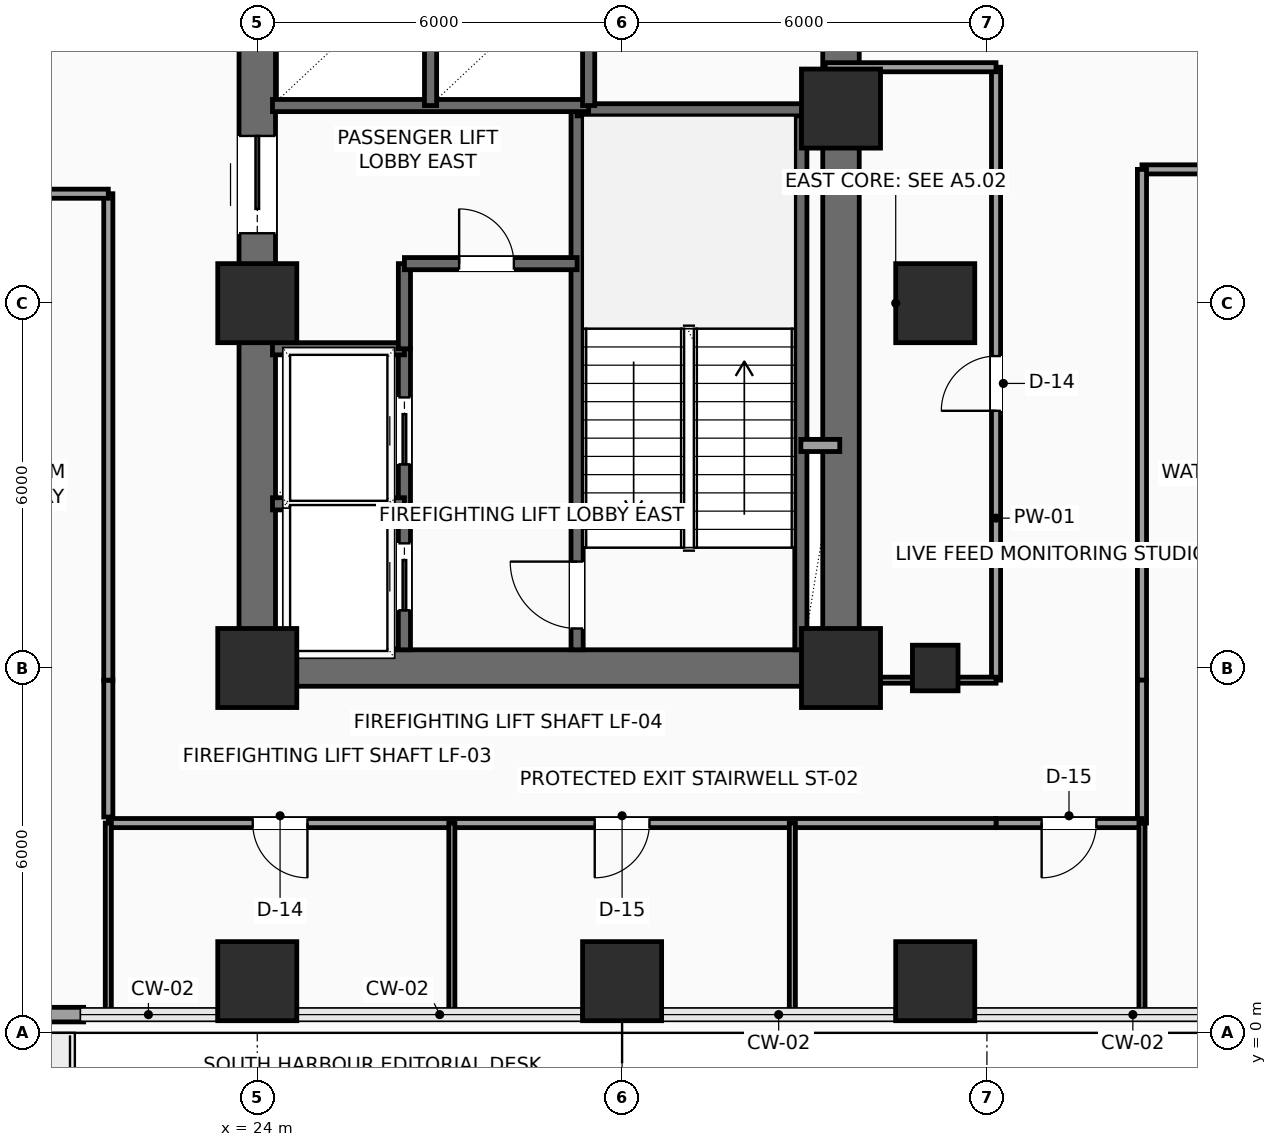
"""IFC4 building model, lengths in metres.
Left out: names, types, materials, properties, quantities, classifications, styles, units other than length and angle.
Written with IfcOpenShell. Run it as: python <this file> out.ifc"""

import sys

from ifc_helpers import new_model, si_unit, direction, frame, frame_2d, origin, origin_2d, place, context, subcontext, project, spatial, rectangle, hollow_rectangle, extrude, element, fill, save


model = new_model("IFC4")
c1 = context("Model", 3, precision=1e-05, world=origin(), true_north=direction((0.0, 1.0)))
c2 = subcontext(c1, "Body", "Model", "MODEL_VIEW")
j1 = project(units=[si_unit("LENGTHUNIT", "METRE"), si_unit("PLANEANGLEUNIT", "RADIAN")], contexts=[c1])
p1 = place(None, origin())
s1 = spatial("IfcSite", under=j1, at=p1, CompositionType="ELEMENT")
p2 = place(p1, origin())
s2 = spatial("IfcBuilding", under=s1, at=p2, CompositionType="ELEMENT")
p3 = place(p2, frame((0.0, 0.0, 32.4)))
s3 = spatial("IfcBuildingStorey", under=s2, at=p3, CompositionType="ELEMENT", Elevation=32.4)
for number, where, z_axis, x_axis in (
    (1, (24.0, 6.0, 0.0), (0.0, 0.0, 1.0), (1.0, 0.0, 0.0)),
    (2, (24.0, 12.0, 0.0), (0.0, 0.0, 1.0), (1.0, 0.0, 0.0)),
    (3, (33.6, 6.0, 0.0), (0.0, 0.0, 1.0), (1.0, 0.0, 0.0)),
    (4, (33.6, 15.2, 0.0), (0.0, 0.0, 1.0), (1.0, 0.0, 0.0)),
    (5, (24.0, 0.85, 0.0), (0.0, 0.0, 1.0), (1.0, 0.0, 0.0)),
    (6, (30.0, 0.85, 0.0), (0.0, 0.0, 1.0), (1.0, 0.0, 0.0)),
    (7, (35.15, 0.85, 0.0), (0.0, 0.0, 1.0), (1.0, 0.0, 0.0)),
):
    element("IfcColumn", number, at=place(p3, frame(where, z_axis=z_axis, x_axis=x_axis)), inside=s3, PredefinedType="COLUMN", context=c2, shape_type="SweptSolid", body=[
        extrude(rectangle(XDim=1.3, YDim=1.3, at=origin_2d()), origin(), (0.0, 0.0, 1.0), 3.9),
    ])
p4 = place(p3, frame((35.15, 6.0, 0.0), z_axis=(0.0, 0.0, 1.0), x_axis=(1.0, 0.0, 0.0)))
e8 = element("IfcColumn", 8, at=p4, inside=s3, PredefinedType="COLUMN", context=c2, shape_type="SweptSolid", body=[
    extrude(hollow_rectangle(XDim=0.75, YDim=0.75, WallThickness=0.035, InnerFilletRadius=0.035, OuterFilletRadius=0.05, at=origin_2d()), origin(), (0.0, 0.0, 1.0), 3.9),
])
p5 = place(p3, frame((35.15, 12.0, 0.0), z_axis=(0.0, 0.0, 1.0), x_axis=(1.0, 0.0, 0.0)))
e9 = element("IfcColumn", 9, at=p5, inside=s3, PredefinedType="COLUMN", context=c2, shape_type="SweptSolid", body=[
    extrude(rectangle(XDim=1.3, YDim=1.3, at=origin_2d()), origin(), (0.0, 0.0, 1.0), 3.9),
])
p6 = place(p3, frame((21.145, 0.3, 0.0), z_axis=(0.0, 0.0, 1.0), x_axis=(-1.0, 0.0, 0.0)))
e10 = element("IfcWall", 10, at=p6, inside=s3, PredefinedType="SOLIDWALL", context=c2, shape_type="SweptSolid", body=[
    extrude(rectangle(XDim=9.29, YDim=0.24, at=frame_2d((4.645, 0.0))), origin(), (0.0, 0.0, 1.0), 3.65),
])
p7 = place(p6, frame((3.945, 0.0, 0.0)))
e11 = element("IfcOpeningElement", 11, at=p7, cuts=e10, PredefinedType="OPENING", context=c2, shape_type="SweptSolid", body=[
    extrude(rectangle(XDim=1.05, YDim=2.2, at=frame_2d((0.525, 1.1))), frame((0.0, 0.13, 0.0), z_axis=(0.0, -1.0, 0.0), x_axis=(1.0, 0.0, 0.0)), (0.0, 0.0, 1.0), 0.26),
])
p8 = place(p3, frame((24.0, 6.0, 0.0), z_axis=(0.0, 0.0, 1.0), x_axis=(1.0, 0.0, 0.0)))
e12 = element("IfcWall", 12, at=p8, inside=s3, PredefinedType="SHEAR", context=c2, shape_type="SweptSolid", body=[
    extrude(rectangle(XDim=9.6, YDim=0.6, at=frame_2d((4.8, 0.0))), origin(), (0.0, 0.0, 1.0), 3.65),
])
p9 = place(p3, frame((24.0, 6.0, 0.0), z_axis=(0.0, 0.0, 1.0), x_axis=(0.0, 1.0, 0.0)))
e13 = element("IfcWall", 13, at=p9, inside=s3, PredefinedType="SHEAR", context=c2, shape_type="SweptSolid", body=[
    extrude(rectangle(XDim=12.0, YDim=0.6, at=frame_2d((6.0, 0.0))), origin(), (0.0, 0.0, 1.0), 3.65),
])
p10 = place(p9, frame((7.15, 0.0, 0.0)))
e14 = element("IfcOpeningElement", 14, at=p10, cuts=e13, PredefinedType="OPENING", context=c2, shape_type="SweptSolid", body=[
    extrude(rectangle(XDim=1.6, YDim=2.3, at=frame_2d((0.8, 1.15))), frame((0.0, 0.31, 0.0), z_axis=(0.0, -1.0, 0.0), x_axis=(1.0, 0.0, 0.0)), (0.0, 0.0, 1.0), 0.62),
])
p11 = place(p3, frame((33.6, 6.0, 0.0), z_axis=(0.0, 0.0, 1.0), x_axis=(0.0, 1.0, 0.0)))
e15 = element("IfcWall", 15, at=p11, inside=s3, PredefinedType="SHEAR", context=c2, shape_type="SweptSolid", body=[
    extrude(rectangle(XDim=12.0, YDim=0.6, at=frame_2d((6.0, 0.0))), origin(), (0.0, 0.0, 1.0), 3.65),
])
p12 = place(p11, frame((10.2, 0.0, 0.0)))
e16 = element("IfcOpeningElement", 16, at=p12, cuts=e15, PredefinedType="OPENING", context=c2, shape_type="SweptSolid", body=[
    extrude(rectangle(XDim=0.9, YDim=2.15, at=frame_2d((0.45, 1.075))), frame((0.0, 0.31, 0.0), z_axis=(0.0, -1.0, 0.0), x_axis=(1.0, 0.0, 0.0)), (0.0, 0.0, 1.0), 0.62),
])
p13 = place(p3, frame((29.26, 6.3, 0.0), z_axis=(0.0, 0.0, 1.0), x_axis=(0.0, 1.0, 0.0)))
e17 = element("IfcWall", 17, at=p13, inside=s3, PredefinedType="SHEAR", context=c2, shape_type="SweptSolid", body=[
    extrude(rectangle(XDim=8.88, YDim=0.2, at=frame_2d((4.44, 0.0))), origin(), (0.0, 0.0, 1.0), 3.65),
])
p14 = place(p13, frame((0.35, 0.0, 0.0)))
e18 = element("IfcOpeningElement", 18, at=p14, cuts=e17, PredefinedType="OPENING", context=c2, shape_type="SweptSolid", body=[
    extrude(rectangle(XDim=1.1, YDim=2.2, at=frame_2d((0.55, 1.1))), frame((0.0, 0.11, 0.0), z_axis=(0.0, -1.0, 0.0), x_axis=(1.0, 0.0, 0.0)), (0.0, 0.0, 1.0), 0.22),
])
p15 = place(p3, frame((32.94, 6.3, 0.0), z_axis=(0.0, 0.0, 1.0), x_axis=(0.0, 1.0, 0.0)))
e19 = element("IfcWall", 19, at=p15, inside=s3, PredefinedType="SHEAR", context=c2, shape_type="SweptSolid", body=[
    extrude(rectangle(XDim=8.88, YDim=0.2, at=frame_2d((4.44, 0.0))), origin(), (0.0, 0.0, 1.0), 3.65),
])
p16 = place(p3, frame((29.26, 15.18, 0.0), z_axis=(0.0, 0.0, 1.0), x_axis=(1.0, 0.0, 0.0)))
e20 = element("IfcWall", 20, at=p16, inside=s3, PredefinedType="SHEAR", context=c2, shape_type="SweptSolid", body=[
    extrude(rectangle(XDim=4.04, YDim=0.2, at=frame_2d((2.02, 0.0))), origin(), (0.0, 0.0, 1.0), 3.65),
])
p17 = place(p3, frame((26.42, 6.3, 0.0), z_axis=(0.0, 0.0, 1.0), x_axis=(0.0, 1.0, 0.0)))
e21 = element("IfcWall", 21, at=p17, inside=s3, PredefinedType="SHEAR", context=c2, shape_type="SweptSolid", body=[
    extrude(rectangle(XDim=4.95, YDim=0.2, at=frame_2d((2.475, 0.0))), origin(), (0.0, 0.0, 1.0), 3.65),
])
p18 = place(p17, frame((0.65, 0.0, 0.0)))
e22 = element("IfcOpeningElement", 22, at=p18, cuts=e21, PredefinedType="OPENING", context=c2, shape_type="SweptSolid", body=[
    extrude(rectangle(XDim=1.1, YDim=2.2, at=frame_2d((0.55, 1.1))), frame((0.0, 0.11, 0.0), z_axis=(0.0, -1.0, 0.0), x_axis=(1.0, 0.0, 0.0)), (0.0, 0.0, 1.0), 0.22),
])
p19 = place(p17, frame((3.05, 0.0, 0.0)))
e23 = element("IfcOpeningElement", 23, at=p19, cuts=e21, PredefinedType="OPENING", context=c2, shape_type="SweptSolid", body=[
    extrude(rectangle(XDim=1.1, YDim=2.2, at=frame_2d((0.55, 1.1))), frame((0.0, 0.11, 0.0), z_axis=(0.0, -1.0, 0.0), x_axis=(1.0, 0.0, 0.0)), (0.0, 0.0, 1.0), 0.22),
])
for number, where, z_axis, x_axis in (
    (24, (24.25, 8.7, 0.0), (0.0, 0.0, 1.0), (1.0, 0.0, 0.0)),
    (25, (24.25, 11.25, 0.0), (0.0, 0.0, 1.0), (1.0, 0.0, 0.0)),
):
    element("IfcWall", number, at=place(p3, frame(where, z_axis=z_axis, x_axis=x_axis)), inside=s3, PredefinedType="SHEAR", context=c2, shape_type="SweptSolid", body=[
        extrude(rectangle(XDim=2.17, YDim=0.2, at=frame_2d((1.085, 0.0))), origin(), (0.0, 0.0, 1.0), 3.65),
    ])
p20 = place(p3, frame((26.42, 11.25, 0.0), z_axis=(0.0, 0.0, 1.0), x_axis=(0.0, 1.0, 0.0)))
e26 = element("IfcWall", 26, at=p20, inside=s3, PredefinedType="SHEAR", context=c2, shape_type="SweptSolid", body=[
    extrude(rectangle(XDim=1.4, YDim=0.2, at=frame_2d((0.7, 0.0))), origin(), (0.0, 0.0, 1.0), 3.65),
])
p21 = place(p3, frame((26.42, 12.65, 0.0), z_axis=(0.0, 0.0, 1.0), x_axis=(1.0, 0.0, 0.0)))
e27 = element("IfcWall", 27, at=p21, inside=s3, PredefinedType="SHEAR", context=c2, shape_type="SweptSolid", body=[
    extrude(rectangle(XDim=2.84, YDim=0.2, at=frame_2d((1.42, 0.0))), origin(), (0.0, 0.0, 1.0), 3.65),
])
p22 = place(p21, frame((0.9, 0.0, 0.0)))
e28 = element("IfcOpeningElement", 28, at=p22, cuts=e27, PredefinedType="OPENING", context=c2, shape_type="SweptSolid", body=[
    extrude(rectangle(XDim=0.9, YDim=2.15, at=frame_2d((0.45, 1.075))), frame((0.0, 0.11, 0.0), z_axis=(0.0, -1.0, 0.0), x_axis=(1.0, 0.0, 0.0)), (0.0, 0.0, 1.0), 0.22),
])
p23 = place(p3, frame((32.94, 9.66, 0.0), z_axis=(0.0, 0.0, 1.0), x_axis=(1.0, 0.0, 0.0)))
e29 = element("IfcWall", 29, at=p23, inside=s3, PredefinedType="SOLIDWALL", context=c2, shape_type="SweptSolid", body=[
    extrude(rectangle(XDim=0.64, YDim=0.2, at=frame_2d((0.32, 0.0))), origin(), (0.0, 0.0, 1.0), 3.65),
])
p24 = place(p3, frame((24.25, 15.25, 0.0), z_axis=(0.0, 0.0, 1.0), x_axis=(1.0, 0.0, 0.0)))
e30 = element("IfcWall", 30, at=p24, inside=s3, PredefinedType="SHEAR", context=c2, shape_type="SweptSolid", body=[
    extrude(rectangle(XDim=5.2, YDim=0.2, at=frame_2d((2.6, 0.0))), origin(), (0.0, 0.0, 1.0), 3.65),
])
p25 = place(p3, frame((26.85, 15.25, 0.0), z_axis=(0.0, 0.0, 1.0), x_axis=(0.0, 1.0, 0.0)))
e31 = element("IfcWall", 31, at=p25, inside=s3, PredefinedType="SHEAR", context=c2, shape_type="SweptSolid", body=[
    extrude(rectangle(XDim=2.4, YDim=0.2, at=frame_2d((1.2, 0.0))), origin(), (0.0, 0.0, 1.0), 3.65),
])
p26 = place(p3, frame((29.45, 15.25, 0.0), z_axis=(0.0, 0.0, 1.0), x_axis=(0.0, 1.0, 0.0)))
e32 = element("IfcWall", 32, at=p26, inside=s3, PredefinedType="SHEAR", context=c2, shape_type="SweptSolid", body=[
    extrude(rectangle(XDim=2.45, YDim=0.2, at=frame_2d((1.225, 0.0))), origin(), (0.0, 0.0, 1.0), 3.65),
])
p27 = place(p3, frame((36.15, 5.8, 0.0), z_axis=(0.0, 0.0, 1.0), x_axis=(0.0, 1.0, 0.0)))
e33 = element("IfcWall", 33, at=p27, inside=s3, PredefinedType="PARTITIONING", context=c2, shape_type="SweptSolid", body=[
    extrude(rectangle(XDim=10.08, YDim=0.15, at=frame_2d((5.04, 0.0))), origin(), (0.0, 0.0, 1.0), 3.65),
])
p28 = place(p27, frame((4.43, 0.0, 0.0)))
e34 = element("IfcOpeningElement", 34, at=p28, cuts=e33, PredefinedType="OPENING", context=c2, shape_type="SweptSolid", body=[
    extrude(rectangle(XDim=0.9, YDim=2.1, at=frame_2d((0.45, 1.05))), frame((0.0, 0.085, 0.0), z_axis=(0.0, -1.0, 0.0), x_axis=(1.0, 0.0, 0.0)), (0.0, 0.0, 1.0), 0.17),
])
p29 = place(p3, frame((36.15, 15.88, 0.0), z_axis=(0.0, 0.0, 1.0), x_axis=(-1.0, 0.0, 0.0)))
e35 = element("IfcWall", 35, at=p29, inside=s3, PredefinedType="PARTITIONING", context=c2, shape_type="SweptSolid", body=[
    extrude(rectangle(XDim=2.81, YDim=0.15, at=frame_2d((1.405, 0.0))), origin(), (0.0, 0.0, 1.0), 3.65),
])
p30 = place(p3, frame((50.9, 14.2, 0.0), z_axis=(0.0, 0.0, 1.0), x_axis=(-1.0, 0.0, 0.0)))
e36 = element("IfcWall", 36, at=p30, inside=s3, PredefinedType="PARTITIONING", context=c2, shape_type="SweptSolid", body=[
    extrude(rectangle(XDim=12.35, YDim=0.15, at=frame_2d((6.175, 0.0))), origin(), (0.0, 0.0, 1.0), 3.65),
])
p31 = place(p30, frame((9.175, 0.0, 0.0)))
e37 = element("IfcOpeningElement", 37, at=p31, cuts=e36, PredefinedType="OPENING", context=c2, shape_type="SweptSolid", body=[
    extrude(rectangle(XDim=0.9, YDim=2.1, at=frame_2d((0.45, 1.05))), frame((0.0, 0.085, 0.0), z_axis=(0.0, -1.0, 0.0), x_axis=(1.0, 0.0, 0.0)), (0.0, 0.0, 1.0), 0.17),
])
p32 = place(p30, frame((3.0, 0.0, 0.0)))
e38 = element("IfcOpeningElement", 38, at=p32, cuts=e36, PredefinedType="OPENING", context=c2, shape_type="SweptSolid", body=[
    extrude(rectangle(XDim=0.9, YDim=2.1, at=frame_2d((0.45, 1.05))), frame((0.0, 0.085, 0.0), z_axis=(0.0, -1.0, 0.0), x_axis=(1.0, 0.0, 0.0)), (0.0, 0.0, 1.0), 0.17),
])
p33 = place(p3, frame((38.55, 14.2, 0.0), z_axis=(0.0, 0.0, 1.0), x_axis=(0.0, -1.0, 0.0)))
e39 = element("IfcWall", 39, at=p33, inside=s3, PredefinedType="PARTITIONING", context=c2, shape_type="SweptSolid", body=[
    extrude(rectangle(XDim=8.4, YDim=0.15, at=frame_2d((4.2, 0.0))), origin(), (0.0, 0.0, 1.0), 3.65),
])
p34 = place(p3, frame((38.55, 5.8, 0.0), z_axis=(0.0, 0.0, 1.0), x_axis=(0.0, -1.0, 0.0)))
e40 = element("IfcWall", 40, at=p34, inside=s3, PredefinedType="PARTITIONING", context=c2, shape_type="SweptSolid", body=[
    extrude(rectangle(XDim=2.35, YDim=0.15, at=frame_2d((1.175, 0.0))), origin(), (0.0, 0.0, 1.0), 3.65),
])
p35 = place(p3, frame((38.55, 3.45, 0.0), z_axis=(0.0, 0.0, 1.0), x_axis=(-1.0, 0.0, 0.0)))
e41 = element("IfcWall", 41, at=p35, inside=s3, PredefinedType="PARTITIONING", context=c2, shape_type="SweptSolid", body=[
    extrude(rectangle(XDim=2.4, YDim=0.15, at=frame_2d((1.2, 0.0))), origin(), (0.0, 0.0, 1.0), 3.142),
])
p36 = place(p35, frame((0.75, 0.0, 0.0)))
e42 = element("IfcOpeningElement", 42, at=p36, cuts=e41, PredefinedType="OPENING", context=c2, shape_type="SweptSolid", body=[
    extrude(rectangle(XDim=0.9, YDim=2.1, at=frame_2d((0.45, 1.05))), frame((0.0, 0.085, 0.0), z_axis=(0.0, -1.0, 0.0), x_axis=(1.0, 0.0, 0.0)), (0.0, 0.0, 1.0), 0.17),
])
p37 = place(p3, frame((36.15, 3.45, 0.0), z_axis=(0.0, 0.0, 1.0), x_axis=(-1.0, 0.0, 0.0)))
e43 = element("IfcWall", 43, at=p37, inside=s3, PredefinedType="PARTITIONING", context=c2, shape_type="SweptSolid", body=[
    extrude(rectangle(XDim=14.6, YDim=0.15, at=frame_2d((7.3, 0.0))), origin(), (0.0, 0.0, 1.0), 3.142),
])
p38 = place(p37, frame((11.325, 0.0, 0.0)))
e44 = element("IfcOpeningElement", 44, at=p38, cuts=e43, PredefinedType="OPENING", context=c2, shape_type="SweptSolid", body=[
    extrude(rectangle(XDim=0.9, YDim=2.1, at=frame_2d((0.45, 1.05))), frame((0.0, 0.085, 0.0), z_axis=(0.0, -1.0, 0.0), x_axis=(1.0, 0.0, 0.0)), (0.0, 0.0, 1.0), 0.17),
])
p39 = place(p37, frame((5.7, 0.0, 0.0)))
e45 = element("IfcOpeningElement", 45, at=p39, cuts=e43, PredefinedType="OPENING", context=c2, shape_type="SweptSolid", body=[
    extrude(rectangle(XDim=0.9, YDim=2.1, at=frame_2d((0.45, 1.05))), frame((0.0, 0.085, 0.0), z_axis=(0.0, -1.0, 0.0), x_axis=(1.0, 0.0, 0.0)), (0.0, 0.0, 1.0), 0.17),
])
p40 = place(p3, frame((21.55, 3.55, 0.0), z_axis=(0.0, 0.0, 1.0), x_axis=(0.0, 1.0, 0.0)))
e46 = element("IfcWall", 46, at=p40, inside=s3, PredefinedType="PARTITIONING", context=c2, shape_type="SweptSolid", body=[
    extrude(rectangle(XDim=2.25, YDim=0.15, at=frame_2d((1.125, 0.0))), origin(), (0.0, 0.0, 1.0), 3.65),
])
p41 = place(p3, frame((21.55, 5.8, 0.0), z_axis=(0.0, 0.0, 1.0), x_axis=(0.0, 1.0, 0.0)))
e47 = element("IfcWall", 47, at=p41, inside=s3, PredefinedType="PARTITIONING", context=c2, shape_type="SweptSolid", body=[
    extrude(rectangle(XDim=8.0, YDim=0.15, at=frame_2d((4.0, 0.0))), origin(), (0.0, 0.0, 1.0), 3.65),
])
p42 = place(p3, frame((21.55, 13.8, 0.0), z_axis=(0.0, 0.0, 1.0), x_axis=(-1.0, 0.0, 0.0)))
e48 = element("IfcWall", 48, at=p42, inside=s3, PredefinedType="PARTITIONING", context=c2, shape_type="SweptSolid", body=[
    extrude(rectangle(XDim=8.95, YDim=0.15, at=frame_2d((4.475, 0.0))), origin(), (0.0, 0.0, 1.0), 3.65),
])
p43 = place(p42, frame((5.4, 0.0, 0.0)))
e49 = element("IfcOpeningElement", 49, at=p43, cuts=e48, PredefinedType="OPENING", context=c2, shape_type="SweptSolid", body=[
    extrude(rectangle(XDim=0.9, YDim=2.1, at=frame_2d((0.45, 1.05))), frame((0.0, 0.085, 0.0), z_axis=(0.0, -1.0, 0.0), x_axis=(1.0, 0.0, 0.0)), (0.0, 0.0, 1.0), 0.17),
])
p44 = place(p42, frame((1.225, 0.0, 0.0)))
e50 = element("IfcOpeningElement", 50, at=p44, cuts=e48, PredefinedType="OPENING", context=c2, shape_type="SweptSolid", body=[
    extrude(rectangle(XDim=0.9, YDim=2.1, at=frame_2d((0.45, 1.05))), frame((0.0, 0.085, 0.0), z_axis=(0.0, -1.0, 0.0), x_axis=(1.0, 0.0, 0.0)), (0.0, 0.0, 1.0), 0.17),
])
for number, where, z_axis, x_axis in (
    (51, (21.55, 0.3, 0.0), (0.0, 0.0, 1.0), (0.0, 1.0, 0.0)),
    (52, (27.2, 0.3, 0.0), (0.0, 0.0, 1.0), (0.0, 1.0, 0.0)),
    (53, (32.8, 0.3, 0.0), (0.0, 0.0, 1.0), (0.0, 1.0, 0.0)),
    (54, (38.55, 0.3, 0.0), (0.0, 0.0, 1.0), (0.0, 1.0, 0.0)),
):
    element("IfcWall", number, at=place(p3, frame(where, z_axis=z_axis, x_axis=x_axis)), inside=s3, PredefinedType="PARTITIONING", context=c2, shape_type="SweptSolid", body=[
        extrude(rectangle(XDim=3.15, YDim=0.1, at=frame_2d((1.575, 0.0))), origin(), (0.0, 0.0, 1.0), 3.65),
    ])
p45 = place(p3, frame((33.65, 5.8, 0.0), z_axis=(0.0, 0.0, 1.0), x_axis=(1.0, 0.0, 0.0)))
e55 = element("IfcWall", 55, at=p45, inside=s3, PredefinedType="PARTITIONING", context=c2, shape_type="SweptSolid", body=[
    extrude(rectangle(XDim=2.5, YDim=0.1, at=frame_2d((1.25, 0.0))), origin(), (0.0, 0.0, 1.0), 2.992),
])
p46 = place(p10, origin())
e56 = element("IfcDoor", 56, at=p46, inside=s3, OperationType="DOUBLE_DOOR_SLIDING", PredefinedType="DOOR", context=c2, shape_type="SweptSolid", body=[
    extrude(rectangle(XDim=1.6, YDim=2.3, at=frame_2d((0.8, 1.15))), frame((0.0, 0.025, 0.0), z_axis=(0.0, -1.0, 0.0), x_axis=(1.0, 0.0, 0.0)), (0.0, 0.0, 1.0), 0.05),
])
fill(e14, e56)
p47 = place(p14, origin())
e57 = element("IfcDoor", 57, at=p47, inside=s3, OperationType="SINGLE_SWING_RIGHT", PredefinedType="DOOR", context=c2, shape_type="SweptSolid", body=[
    extrude(rectangle(XDim=1.1, YDim=2.2, at=frame_2d((0.55, 1.1))), frame((0.0, 0.025, 0.0), z_axis=(0.0, -1.0, 0.0), x_axis=(1.0, 0.0, 0.0)), (0.0, 0.0, 1.0), 0.05),
])
fill(e18, e57)
p48 = place(p18, origin())
e58 = element("IfcDoor", 58, at=p48, inside=s3, OperationType="SLIDING_TO_LEFT", PredefinedType="DOOR", context=c2, shape_type="SweptSolid", body=[
    extrude(rectangle(XDim=1.1, YDim=2.2, at=frame_2d((0.55, 1.1))), frame((0.0, 0.025, 0.0), z_axis=(0.0, -1.0, 0.0), x_axis=(1.0, 0.0, 0.0)), (0.0, 0.0, 1.0), 0.05),
])
fill(e22, e58)
p49 = place(p19, origin())
e59 = element("IfcDoor", 59, at=p49, inside=s3, OperationType="SLIDING_TO_LEFT", PredefinedType="DOOR", context=c2, shape_type="SweptSolid", body=[
    extrude(rectangle(XDim=1.1, YDim=2.2, at=frame_2d((0.55, 1.1))), frame((0.0, 0.025, 0.0), z_axis=(0.0, -1.0, 0.0), x_axis=(1.0, 0.0, 0.0)), (0.0, 0.0, 1.0), 0.05),
])
fill(e23, e59)
p50 = place(p22, origin())
e60 = element("IfcDoor", 60, at=p50, inside=s3, OperationType="SINGLE_SWING_LEFT", PredefinedType="DOOR", context=c2, shape_type="SweptSolid", body=[
    extrude(rectangle(XDim=0.9, YDim=2.15, at=frame_2d((0.45, 1.075))), frame((0.0, 0.025, 0.0), z_axis=(0.0, -1.0, 0.0), x_axis=(1.0, 0.0, 0.0)), (0.0, 0.0, 1.0), 0.05),
])
fill(e28, e60)
p51 = place(p28, origin())
e61 = element("IfcDoor", 61, at=p51, inside=s3, OperationType="SINGLE_SWING_LEFT", PredefinedType="DOOR", context=c2, shape_type="SweptSolid", body=[
    extrude(rectangle(XDim=0.9, YDim=2.1, at=frame_2d((0.45, 1.05))), frame((0.0, 0.025, 0.0), z_axis=(0.0, -1.0, 0.0), x_axis=(1.0, 0.0, 0.0)), (0.0, 0.0, 1.0), 0.05),
])
fill(e34, e61)
p52 = place(p36, origin())
e62 = element("IfcDoor", 62, at=p52, inside=s3, OperationType="SINGLE_SWING_RIGHT", PredefinedType="DOOR", context=c2, shape_type="SweptSolid", body=[
    extrude(rectangle(XDim=0.9, YDim=2.1, at=frame_2d((0.45, 1.05))), frame((0.0, 0.025, 0.0), z_axis=(0.0, -1.0, 0.0), x_axis=(1.0, 0.0, 0.0)), (0.0, 0.0, 1.0), 0.05),
])
fill(e42, e62)
p53 = place(p38, origin())
e63 = element("IfcDoor", 63, at=p53, inside=s3, OperationType="SINGLE_SWING_LEFT", PredefinedType="DOOR", context=c2, shape_type="SweptSolid", body=[
    extrude(rectangle(XDim=0.9, YDim=2.1, at=frame_2d((0.45, 1.05))), frame((0.0, 0.025, 0.0), z_axis=(0.0, -1.0, 0.0), x_axis=(1.0, 0.0, 0.0)), (0.0, 0.0, 1.0), 0.05),
])
fill(e44, e63)
p54 = place(p39, origin())
e64 = element("IfcDoor", 64, at=p54, inside=s3, OperationType="SINGLE_SWING_RIGHT", PredefinedType="DOOR", context=c2, shape_type="SweptSolid", body=[
    extrude(rectangle(XDim=0.9, YDim=2.1, at=frame_2d((0.45, 1.05))), frame((0.0, 0.025, 0.0), z_axis=(0.0, -1.0, 0.0), x_axis=(1.0, 0.0, 0.0)), (0.0, 0.0, 1.0), 0.05),
])
fill(e45, e64)
save(model, sys.argv[1])
